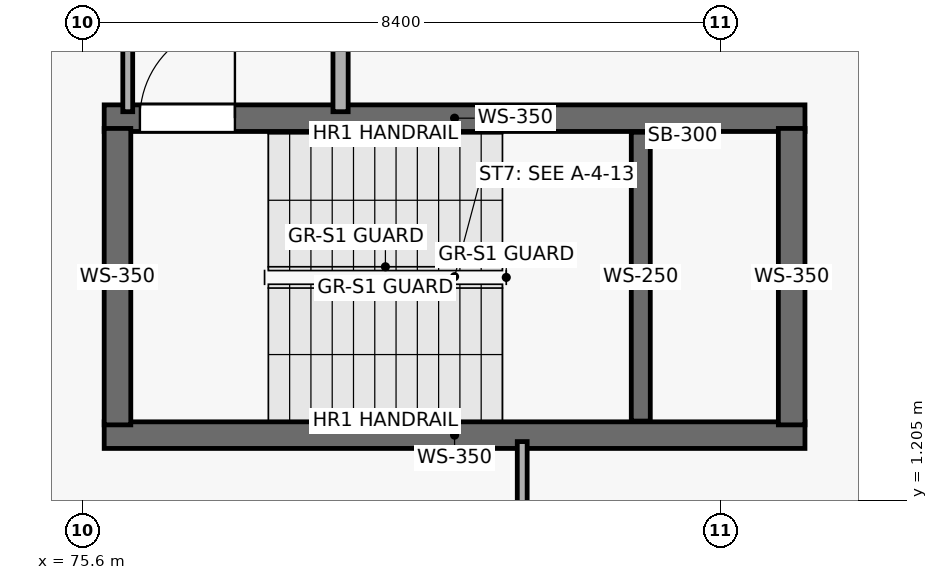
"""IFC4 building model, lengths in metres.
Left out: names, types, materials, properties, quantities, classifications, styles, units other than length and angle.
Written with IfcOpenShell. Run it as: python <this file> out.ifc"""

import sys

from ifc_helpers import new_model, si_unit, direction, frame, frame_2d, origin, place, context, subcontext, project, spatial, rectangle, extrude, element, fill, save


model = new_model("IFC4")
c1 = context("Model", 3, precision=1e-05, world=origin(), true_north=direction((0.0, 1.0)))
c2 = subcontext(c1, "Body", "Model", "MODEL_VIEW")
j1 = project(units=[si_unit("LENGTHUNIT", "METRE"), si_unit("PLANEANGLEUNIT", "RADIAN")], contexts=[c1])
p1 = place(None, origin())
s1 = spatial("IfcSite", under=j1, at=p1, CompositionType="ELEMENT")
p2 = place(p1, origin())
s2 = spatial("IfcBuilding", under=s1, at=p2, CompositionType="ELEMENT")
p3 = place(p2, frame((0.0, 0.0, -4.5)))
s3 = spatial("IfcBuildingStorey", under=s2, at=p3, CompositionType="ELEMENT", Elevation=-4.5)
p4 = place(p3, frame((75.89, 2.065, 0.0), z_axis=(0.0, 0.0, 1.0), x_axis=(1.0, 0.0, 0.0)))
e1 = element("IfcWall", 1, at=p4, inside=s3, PredefinedType="SHEAR", context=c2, shape_type="SweptSolid", body=[
    extrude(rectangle(XDim=9.22, YDim=0.35, at=frame_2d((4.61, 0.0))), origin(), (0.0, 0.0, 1.0), 4.22),
])
p5 = place(p3, frame((85.11, 6.235, 0.0), z_axis=(0.0, 0.0, 1.0), x_axis=(-1.0, 0.0, 0.0)))
e2 = element("IfcWall", 2, at=p5, inside=s3, PredefinedType="SHEAR", context=c2, shape_type="SweptSolid", body=[
    extrude(rectangle(XDim=9.22, YDim=0.35, at=frame_2d((4.61, 0.0))), origin(), (0.0, 0.0, 1.0), 4.22),
])
p6 = place(p5, frame((7.5, 0.0, 0.0)))
e3 = element("IfcOpeningElement", 3, at=p6, cuts=e2, PredefinedType="OPENING", context=c2, shape_type="SweptSolid", body=[
    extrude(rectangle(XDim=1.25, YDim=2.2, at=frame_2d((0.625, 1.1))), frame((0.0, 0.185, 0.0), z_axis=(0.0, -1.0, 0.0), x_axis=(1.0, 0.0, 0.0)), (0.0, 0.0, 1.0), 0.37),
])
for number, where, z_axis, x_axis in (
    (4, (76.065, 2.2, 0.0), (0.0, 0.0, 1.0), (0.0, 1.0, 0.0)),
    (5, (84.935, 6.1, 0.0), (0.0, 0.0, 1.0), (0.0, -1.0, 0.0)),
):
    element("IfcWall", number, at=place(p3, frame(where, z_axis=z_axis, x_axis=x_axis)), inside=s3, PredefinedType="SHEAR", context=c2, shape_type="SweptSolid", body=[
        extrude(rectangle(XDim=3.9, YDim=0.35, at=frame_2d((1.95, 0.0))), origin(), (0.0, 0.0, 1.0), 4.22),
    ])
p7 = place(p3, frame((82.95, 2.25, 0.0), z_axis=(0.0, 0.0, 1.0), x_axis=(0.0, 1.0, 0.0)))
e6 = element("IfcWall", 6, at=p7, inside=s3, PredefinedType="SHEAR", context=c2, shape_type="SweptSolid", body=[
    extrude(rectangle(XDim=3.8, YDim=0.25, at=frame_2d((1.9, 0.0))), origin(), (0.0, 0.0, 1.0), 2.07),
])
p8 = place(p3, frame((76.2, 9.055, 0.0), z_axis=(0.0, 0.0, 1.0), x_axis=(0.0, -1.0, 0.0)))
e7 = element("IfcWall", 7, at=p8, inside=s3, PredefinedType="PARTITIONING", context=c2, shape_type="SweptSolid", body=[
    extrude(rectangle(XDim=2.735, YDim=0.13, at=frame_2d((1.367, 0.0))), origin(), (0.0, 0.0, 1.0), 3.41),
])
p9 = place(p3, frame((79.0, 6.32, 0.0), z_axis=(0.0, 0.0, 1.0), x_axis=(0.0, 1.0, 0.0)))
e8 = element("IfcWall", 8, at=p9, inside=s3, PredefinedType="PARTITIONING", context=c2, shape_type="SweptSolid", body=[
    extrude(rectangle(XDim=2.7, YDim=0.2, at=frame_2d((1.35, 0.0))), origin(), (0.0, 0.0, 1.0), 4.22),
])
p10 = place(p3, frame((81.39, 1.98, 0.0), z_axis=(0.0, 0.0, 1.0), x_axis=(0.0, -1.0, 0.0)))
e9 = element("IfcWall", 9, at=p10, inside=s3, PredefinedType="PARTITIONING", context=c2, shape_type="SweptSolid", body=[
    extrude(rectangle(XDim=1.92, YDim=0.13, at=frame_2d((0.96, 0.0))), origin(), (0.0, 0.0, 1.0), 4.22),
])
p11 = place(p6, origin())
e10 = element("IfcDoor", 10, at=p11, inside=s3, OperationType="SINGLE_SWING_RIGHT", PredefinedType="DOOR", context=c2, shape_type="SweptSolid", body=[
    extrude(rectangle(XDim=1.25, YDim=2.2, at=frame_2d((0.625, 1.1))), frame((0.0, 0.025, 0.0), z_axis=(0.0, -1.0, 0.0), x_axis=(1.0, 0.0, 0.0)), (0.0, 0.0, 1.0), 0.05),
])
fill(e3, e10)
save(model, sys.argv[1])
